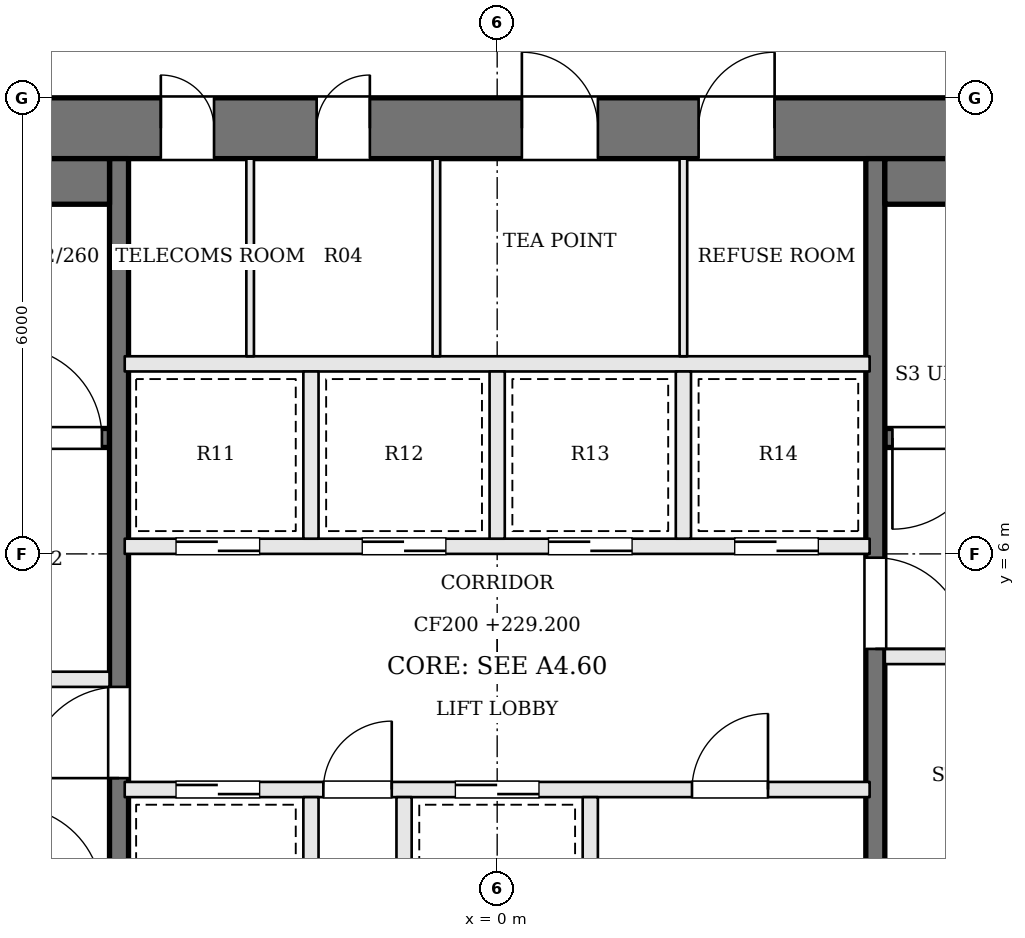
"""IFC4 building model, lengths in metres.
Left out: names, types, materials, properties, quantities, classifications, styles, units other than length and angle.
Written with IfcOpenShell. Run it as: python <this file> out.ifc"""

import sys

from ifc_helpers import new_model, si_unit, direction, frame, frame_2d, origin, place, context, subcontext, project, spatial, rectangle, extrude, element, fill, save


model = new_model("IFC4")
c1 = context("Model", 3, precision=1e-05, world=origin(), true_north=direction((0.0, 1.0)))
c2 = subcontext(c1, "Body", "Model", "MODEL_VIEW")
j1 = project(units=[si_unit("LENGTHUNIT", "METRE"), si_unit("PLANEANGLEUNIT", "RADIAN")], contexts=[c1])
p1 = place(None, origin())
s1 = spatial("IfcSite", under=j1, at=p1, CompositionType="ELEMENT")
p2 = place(p1, origin())
s2 = spatial("IfcBuilding", under=s1, at=p2, CompositionType="ELEMENT")
p3 = place(p2, frame((0.0, 0.0, 229.2)))
s3 = spatial("IfcBuildingStorey", under=s2, at=p3, CompositionType="ELEMENT", Elevation=229.2)
p4 = place(p3, frame((-13.0, 11.6, 0.0), z_axis=(0.0, 0.0, 1.0), x_axis=(1.0, 0.0, 0.0)))
e1 = element("IfcWall", 1, at=p4, inside=s3, PredefinedType="SHEAR", context=c2, shape_type="SweptSolid", body=[
    extrude(rectangle(XDim=26.0, YDim=0.8, at=frame_2d((13.0, 0.0))), origin(), (0.0, 0.0, 1.0), 3.9),
])
p5 = place(p4, frame((8.575, 0.0, 0.0)))
e2 = element("IfcOpeningElement", 2, at=p5, cuts=e1, PredefinedType="OPENING", context=c2, shape_type="SweptSolid", body=[
    extrude(rectangle(XDim=0.7, YDim=2.1, at=frame_2d((0.35, 1.05))), frame((0.0, 0.41, 0.0), z_axis=(0.0, -1.0, 0.0), x_axis=(1.0, 0.0, 0.0)), (0.0, 0.0, 1.0), 0.82),
])
p6 = place(p4, frame((10.625, 0.0, 0.0)))
e3 = element("IfcOpeningElement", 3, at=p6, cuts=e1, PredefinedType="OPENING", context=c2, shape_type="SweptSolid", body=[
    extrude(rectangle(XDim=0.7, YDim=2.1, at=frame_2d((0.35, 1.05))), frame((0.0, 0.41, 0.0), z_axis=(0.0, -1.0, 0.0), x_axis=(1.0, 0.0, 0.0)), (0.0, 0.0, 1.0), 0.82),
])
p7 = place(p4, frame((13.325, 0.0, 0.0)))
e4 = element("IfcOpeningElement", 4, at=p7, cuts=e1, PredefinedType="OPENING", context=c2, shape_type="SweptSolid", body=[
    extrude(rectangle(XDim=1.0, YDim=2.1, at=frame_2d((0.5, 1.05))), frame((0.0, 0.41, 0.0), z_axis=(0.0, -1.0, 0.0), x_axis=(1.0, 0.0, 0.0)), (0.0, 0.0, 1.0), 0.82),
])
p8 = place(p4, frame((15.65, 0.0, 0.0)))
e5 = element("IfcOpeningElement", 5, at=p8, cuts=e1, PredefinedType="OPENING", context=c2, shape_type="SweptSolid", body=[
    extrude(rectangle(XDim=1.0, YDim=2.1, at=frame_2d((0.5, 1.05))), frame((0.0, 0.41, 0.0), z_axis=(0.0, -1.0, 0.0), x_axis=(1.0, 0.0, 0.0)), (0.0, 0.0, 1.0), 0.82),
])
p9 = place(p3, frame((12.2, 7.525, 0.0), z_axis=(0.0, 0.0, 1.0), x_axis=(-1.0, 0.0, 0.0)))
e6 = element("IfcWall", 6, at=p9, inside=s3, PredefinedType="SOLIDWALL", context=c2, shape_type="SweptSolid", body=[
    extrude(rectangle(XDim=7.1, YDim=0.25, at=frame_2d((3.55, 0.0))), origin(), (0.0, 0.0, 1.0), 3.7),
])
p10 = place(p9, frame((5.8, 0.0, 0.0)))
e7 = element("IfcOpeningElement", 7, at=p10, cuts=e6, PredefinedType="OPENING", context=c2, shape_type="SweptSolid", body=[
    extrude(rectangle(XDim=1.2, YDim=2.1, at=frame_2d((0.6, 1.05))), frame((0.0, 0.135, 0.0), z_axis=(0.0, -1.0, 0.0), x_axis=(1.0, 0.0, 0.0)), (0.0, 0.0, 1.0), 0.27),
])
p11 = place(p3, frame((-12.2, 4.35, 0.0), z_axis=(0.0, 0.0, 1.0), x_axis=(1.0, 0.0, 0.0)))
e8 = element("IfcWall", 8, at=p11, inside=s3, PredefinedType="SOLIDWALL", context=c2, shape_type="SweptSolid", body=[
    extrude(rectangle(XDim=7.1, YDim=0.2, at=frame_2d((3.55, 0.0))), origin(), (0.0, 0.0, 1.0), 3.7),
])
p12 = place(p11, frame((4.4, 0.0, 0.0)))
e9 = element("IfcOpeningElement", 9, at=p12, cuts=e8, PredefinedType="OPENING", context=c2, shape_type="SweptSolid", body=[
    extrude(rectangle(XDim=1.2, YDim=2.1, at=frame_2d((0.6, 1.05))), frame((0.0, 0.11, 0.0), z_axis=(0.0, -1.0, 0.0), x_axis=(1.0, 0.0, 0.0)), (0.0, 0.0, 1.0), 0.22),
])
p13 = place(p11, frame((1.1, 0.0, 0.0)))
e10 = element("IfcOpeningElement", 10, at=p13, cuts=e8, PredefinedType="OPENING", context=c2, shape_type="SweptSolid", body=[
    extrude(rectangle(XDim=1.2, YDim=2.1, at=frame_2d((0.6, 1.05))), frame((0.0, 0.11, 0.0), z_axis=(0.0, -1.0, 0.0), x_axis=(1.0, 0.0, 0.0)), (0.0, 0.0, 1.0), 0.22),
])
p14 = place(p3, frame((12.2, 4.65, 0.0), z_axis=(0.0, 0.0, 1.0), x_axis=(-1.0, 0.0, 0.0)))
e11 = element("IfcWall", 11, at=p14, inside=s3, PredefinedType="SOLIDWALL", context=c2, shape_type="SweptSolid", body=[
    extrude(rectangle(XDim=7.1, YDim=0.2, at=frame_2d((3.55, 0.0))), origin(), (0.0, 0.0, 1.0), 3.7),
])
p15 = place(p14, frame((4.4, 0.0, 0.0)))
e12 = element("IfcOpeningElement", 12, at=p15, cuts=e11, PredefinedType="OPENING", context=c2, shape_type="SweptSolid", body=[
    extrude(rectangle(XDim=1.2, YDim=2.1, at=frame_2d((0.6, 1.05))), frame((0.0, 0.11, 0.0), z_axis=(0.0, -1.0, 0.0), x_axis=(1.0, 0.0, 0.0)), (0.0, 0.0, 1.0), 0.22),
])
p16 = place(p14, frame((1.1, 0.0, 0.0)))
e13 = element("IfcOpeningElement", 13, at=p16, cuts=e11, PredefinedType="OPENING", context=c2, shape_type="SweptSolid", body=[
    extrude(rectangle(XDim=1.2, YDim=2.1, at=frame_2d((0.6, 1.05))), frame((0.0, 0.11, 0.0), z_axis=(0.0, -1.0, 0.0), x_axis=(1.0, 0.0, 0.0)), (0.0, 0.0, 1.0), 0.22),
])
p17 = place(p3, frame((-12.2, 7.525, 0.0), z_axis=(0.0, 0.0, 1.0), x_axis=(1.0, 0.0, 0.0)))
e14 = element("IfcWall", 14, at=p17, inside=s3, PredefinedType="SOLIDWALL", context=c2, shape_type="SweptSolid", body=[
    extrude(rectangle(XDim=7.1, YDim=0.25, at=frame_2d((3.55, 0.0))), origin(), (0.0, 0.0, 1.0), 3.7),
])
p18 = place(p17, frame((5.8, 0.0, 0.0)))
e15 = element("IfcOpeningElement", 15, at=p18, cuts=e14, PredefinedType="OPENING", context=c2, shape_type="SweptSolid", body=[
    extrude(rectangle(XDim=1.2, YDim=2.1, at=frame_2d((0.6, 1.05))), frame((0.0, 0.135, 0.0), z_axis=(0.0, -1.0, 0.0), x_axis=(1.0, 0.0, 0.0)), (0.0, 0.0, 1.0), 0.27),
])
p19 = place(p3, frame((-4.975, -2.2, 0.0), z_axis=(0.0, 0.0, 1.0), x_axis=(0.0, 1.0, 0.0)))
e16 = element("IfcWall", 16, at=p19, inside=s3, PredefinedType="SOLIDWALL", context=c2, shape_type="SweptSolid", body=[
    extrude(rectangle(XDim=13.4, YDim=0.25, at=frame_2d((6.7, 0.0))), origin(), (0.0, 0.0, 1.0), 3.7),
])
p20 = place(p19, frame((5.25, 0.0, 0.0)))
e17 = element("IfcOpeningElement", 17, at=p20, cuts=e16, PredefinedType="OPENING", context=c2, shape_type="SweptSolid", body=[
    extrude(rectangle(XDim=1.2, YDim=2.1, at=frame_2d((0.6, 1.05))), frame((0.0, 0.135, 0.0), z_axis=(0.0, -1.0, 0.0), x_axis=(1.0, 0.0, 0.0)), (0.0, 0.0, 1.0), 0.27),
])
p21 = place(p3, frame((4.975, 11.2, 0.0), z_axis=(0.0, 0.0, 1.0), x_axis=(0.0, -1.0, 0.0)))
e18 = element("IfcWall", 18, at=p21, inside=s3, PredefinedType="SOLIDWALL", context=c2, shape_type="SweptSolid", body=[
    extrude(rectangle(XDim=13.4, YDim=0.25, at=frame_2d((6.7, 0.0))), origin(), (0.0, 0.0, 1.0), 3.7),
])
p22 = place(p21, frame((5.25, 0.0, 0.0)))
e19 = element("IfcOpeningElement", 19, at=p22, cuts=e18, PredefinedType="OPENING", context=c2, shape_type="SweptSolid", body=[
    extrude(rectangle(XDim=1.2, YDim=2.1, at=frame_2d((0.6, 1.05))), frame((0.0, 0.135, 0.0), z_axis=(0.0, -1.0, 0.0), x_axis=(1.0, 0.0, 0.0)), (0.0, 0.0, 1.0), 0.27),
])
for number, where, z_axis, x_axis in (
    (20, (-12.2, 10.9, 0.0), (0.0, 0.0, 1.0), (1.0, 0.0, 0.0)),
    (21, (12.2, 10.9, 0.0), (0.0, 0.0, 1.0), (-1.0, 0.0, 0.0)),
):
    element("IfcWall", number, at=place(p3, frame(where, z_axis=z_axis, x_axis=x_axis)), inside=s3, PredefinedType="SOLIDWALL", context=c2, shape_type="SweptSolid", body=[
        extrude(rectangle(XDim=7.1, YDim=0.6, at=frame_2d((3.55, 0.0))), origin(), (0.0, 0.0, 1.0), 3.7),
    ])
p23 = place(p3, frame((-4.9, 2.9, 0.0), z_axis=(0.0, 0.0, 1.0), x_axis=(1.0, 0.0, 0.0)))
e22 = element("IfcWall", 22, at=p23, inside=s3, PredefinedType="SOLIDWALL", context=c2, shape_type="SweptSolid", body=[
    extrude(rectangle(XDim=9.8, YDim=0.2, at=frame_2d((4.9, 0.0))), origin(), (0.0, 0.0, 1.0), 3.7),
])
p24 = place(p23, frame((0.675, 0.0, 0.0)))
e23 = element("IfcOpeningElement", 23, at=p24, cuts=e22, PredefinedType="OPENING", context=c2, shape_type="SweptSolid", body=[
    extrude(rectangle(XDim=1.1, YDim=2.1, at=frame_2d((0.55, 1.05))), frame((0.0, 0.11, 0.0), z_axis=(0.0, -1.0, 0.0), x_axis=(1.0, 0.0, 0.0)), (0.0, 0.0, 1.0), 0.22),
])
p25 = place(p23, frame((2.613, 0.0, 0.0)))
e24 = element("IfcOpeningElement", 24, at=p25, cuts=e22, PredefinedType="OPENING", context=c2, shape_type="SweptSolid", body=[
    extrude(rectangle(XDim=0.9, YDim=2.1, at=frame_2d((0.45, 1.05))), frame((0.0, 0.11, 0.0), z_axis=(0.0, -1.0, 0.0), x_axis=(1.0, 0.0, 0.0)), (0.0, 0.0, 1.0), 0.22),
])
p26 = place(p23, frame((4.35, 0.0, 0.0)))
e25 = element("IfcOpeningElement", 25, at=p26, cuts=e22, PredefinedType="OPENING", context=c2, shape_type="SweptSolid", body=[
    extrude(rectangle(XDim=1.1, YDim=2.1, at=frame_2d((0.55, 1.05))), frame((0.0, 0.11, 0.0), z_axis=(0.0, -1.0, 0.0), x_axis=(1.0, 0.0, 0.0)), (0.0, 0.0, 1.0), 0.22),
])
p27 = place(p23, frame((7.463, 0.0, 0.0)))
e26 = element("IfcOpeningElement", 26, at=p27, cuts=e22, PredefinedType="OPENING", context=c2, shape_type="SweptSolid", body=[
    extrude(rectangle(XDim=1.0, YDim=2.1, at=frame_2d((0.5, 1.05))), frame((0.0, 0.11, 0.0), z_axis=(0.0, -1.0, 0.0), x_axis=(1.0, 0.0, 0.0)), (0.0, 0.0, 1.0), 0.22),
])
p28 = place(p3, frame((-4.9, 6.1, 0.0), z_axis=(0.0, 0.0, 1.0), x_axis=(1.0, 0.0, 0.0)))
e27 = element("IfcWall", 27, at=p28, inside=s3, PredefinedType="SOLIDWALL", context=c2, shape_type="SweptSolid", body=[
    extrude(rectangle(XDim=9.8, YDim=0.2, at=frame_2d((4.9, 0.0))), origin(), (0.0, 0.0, 1.0), 3.7),
])
p29 = place(p28, frame((0.675, 0.0, 0.0)))
e28 = element("IfcOpeningElement", 28, at=p29, cuts=e27, PredefinedType="OPENING", context=c2, shape_type="SweptSolid", body=[
    extrude(rectangle(XDim=1.1, YDim=2.1, at=frame_2d((0.55, 1.05))), frame((0.0, 0.11, 0.0), z_axis=(0.0, -1.0, 0.0), x_axis=(1.0, 0.0, 0.0)), (0.0, 0.0, 1.0), 0.22),
])
p30 = place(p28, frame((3.125, 0.0, 0.0)))
e29 = element("IfcOpeningElement", 29, at=p30, cuts=e27, PredefinedType="OPENING", context=c2, shape_type="SweptSolid", body=[
    extrude(rectangle(XDim=1.1, YDim=2.1, at=frame_2d((0.55, 1.05))), frame((0.0, 0.11, 0.0), z_axis=(0.0, -1.0, 0.0), x_axis=(1.0, 0.0, 0.0)), (0.0, 0.0, 1.0), 0.22),
])
p31 = place(p28, frame((5.575, 0.0, 0.0)))
e30 = element("IfcOpeningElement", 30, at=p31, cuts=e27, PredefinedType="OPENING", context=c2, shape_type="SweptSolid", body=[
    extrude(rectangle(XDim=1.1, YDim=2.1, at=frame_2d((0.55, 1.05))), frame((0.0, 0.11, 0.0), z_axis=(0.0, -1.0, 0.0), x_axis=(1.0, 0.0, 0.0)), (0.0, 0.0, 1.0), 0.22),
])
p32 = place(p28, frame((8.025, 0.0, 0.0)))
e31 = element("IfcOpeningElement", 31, at=p32, cuts=e27, PredefinedType="OPENING", context=c2, shape_type="SweptSolid", body=[
    extrude(rectangle(XDim=1.1, YDim=2.1, at=frame_2d((0.55, 1.05))), frame((0.0, 0.11, 0.0), z_axis=(0.0, -1.0, 0.0), x_axis=(1.0, 0.0, 0.0)), (0.0, 0.0, 1.0), 0.22),
])
p33 = place(p3, frame((-4.9, 8.5, 0.0), z_axis=(0.0, 0.0, 1.0), x_axis=(1.0, 0.0, 0.0)))
e32 = element("IfcWall", 32, at=p33, inside=s3, PredefinedType="SOLIDWALL", context=c2, shape_type="SweptSolid", body=[
    extrude(rectangle(XDim=9.8, YDim=0.2, at=frame_2d((4.9, 0.0))), origin(), (0.0, 0.0, 1.0), 3.7),
])
for number, where, z_axis, x_axis in (
    (33, (-2.45, 0.6, 0.0), (0.0, 0.0, 1.0), (0.0, 1.0, 0.0)),
    (34, (-1.225, 0.6, 0.0), (0.0, 0.0, 1.0), (0.0, 1.0, 0.0)),
    (35, (1.225, 0.6, 0.0), (0.0, 0.0, 1.0), (0.0, 1.0, 0.0)),
    (36, (-2.45, 6.2, 0.0), (0.0, 0.0, 1.0), (0.0, 1.0, 0.0)),
    (37, (0.0, 6.2, 0.0), (0.0, 0.0, 1.0), (0.0, 1.0, 0.0)),
    (38, (2.45, 6.2, 0.0), (0.0, 0.0, 1.0), (0.0, 1.0, 0.0)),
):
    element("IfcWall", number, at=place(p3, frame(where, z_axis=z_axis, x_axis=x_axis)), inside=s3, PredefinedType="SOLIDWALL", context=c2, shape_type="SweptSolid", body=[
        extrude(rectangle(XDim=2.2, YDim=0.2, at=frame_2d((1.1, 0.0))), origin(), (0.0, 0.0, 1.0), 3.7),
    ])
for number, where, z_axis, x_axis in (
    (39, (-3.25, 8.6, 0.0), (0.0, 0.0, 1.0), (0.0, 1.0, 0.0)),
    (40, (-0.8, 8.6, 0.0), (0.0, 0.0, 1.0), (0.0, 1.0, 0.0)),
    (41, (2.45, 8.6, 0.0), (0.0, 0.0, 1.0), (0.0, 1.0, 0.0)),
):
    element("IfcWall", number, at=place(p3, frame(where, z_axis=z_axis, x_axis=x_axis)), inside=s3, PredefinedType="PARTITIONING", context=c2, shape_type="SweptSolid", body=[
        extrude(rectangle(XDim=2.6, YDim=0.1, at=frame_2d((1.3, 0.0))), origin(), (0.0, 0.0, 1.0), 3.7),
    ])
p34 = place(p20, origin())
e42 = element("IfcDoor", 42, at=p34, inside=s3, OperationType="SINGLE_SWING_LEFT", PredefinedType="DOOR", context=c2, shape_type="SweptSolid", body=[
    extrude(rectangle(XDim=1.2, YDim=2.1, at=frame_2d((0.6, 1.05))), frame((0.0, 0.025, 0.0), z_axis=(0.0, -1.0, 0.0), x_axis=(1.0, 0.0, 0.0)), (0.0, 0.0, 1.0), 0.05),
])
fill(e17, e42)
p35 = place(p22, origin())
e43 = element("IfcDoor", 43, at=p35, inside=s3, OperationType="SINGLE_SWING_RIGHT", PredefinedType="DOOR", context=c2, shape_type="SweptSolid", body=[
    extrude(rectangle(XDim=1.2, YDim=2.1, at=frame_2d((0.6, 1.05))), frame((0.0, 0.025, 0.0), z_axis=(0.0, -1.0, 0.0), x_axis=(1.0, 0.0, 0.0)), (0.0, 0.0, 1.0), 0.05),
])
fill(e19, e43)
p36 = place(p10, origin())
e44 = element("IfcDoor", 44, at=p36, inside=s3, OperationType="SINGLE_SWING_RIGHT", PredefinedType="DOOR", context=c2, shape_type="SweptSolid", body=[
    extrude(rectangle(XDim=1.2, YDim=2.1, at=frame_2d((0.6, 1.05))), frame((0.0, 0.025, 0.0), z_axis=(0.0, -1.0, 0.0), x_axis=(1.0, 0.0, 0.0)), (0.0, 0.0, 1.0), 0.05),
])
fill(e7, e44)
p37 = place(p18, origin())
e45 = element("IfcDoor", 45, at=p37, inside=s3, OperationType="SINGLE_SWING_LEFT", PredefinedType="DOOR", context=c2, shape_type="SweptSolid", body=[
    extrude(rectangle(XDim=1.2, YDim=2.1, at=frame_2d((0.6, 1.05))), frame((0.0, 0.025, 0.0), z_axis=(0.0, -1.0, 0.0), x_axis=(1.0, 0.0, 0.0)), (0.0, 0.0, 1.0), 0.05),
])
fill(e15, e45)
p38 = place(p24, origin())
e46 = element("IfcDoor", 46, at=p38, inside=s3, OperationType="SLIDING_TO_RIGHT", PredefinedType="DOOR", context=c2, shape_type="SweptSolid", body=[
    extrude(rectangle(XDim=1.1, YDim=2.1, at=frame_2d((0.55, 1.05))), frame((0.0, 0.025, 0.0), z_axis=(0.0, -1.0, 0.0), x_axis=(1.0, 0.0, 0.0)), (0.0, 0.0, 1.0), 0.05),
])
fill(e23, e46)
p39 = place(p25, origin())
e47 = element("IfcDoor", 47, at=p39, inside=s3, OperationType="SINGLE_SWING_RIGHT", PredefinedType="DOOR", context=c2, shape_type="SweptSolid", body=[
    extrude(rectangle(XDim=0.9, YDim=2.1, at=frame_2d((0.45, 1.05))), frame((0.0, 0.025, 0.0), z_axis=(0.0, -1.0, 0.0), x_axis=(1.0, 0.0, 0.0)), (0.0, 0.0, 1.0), 0.05),
])
fill(e24, e47)
p40 = place(p26, origin())
e48 = element("IfcDoor", 48, at=p40, inside=s3, OperationType="SLIDING_TO_LEFT", PredefinedType="DOOR", context=c2, shape_type="SweptSolid", body=[
    extrude(rectangle(XDim=1.1, YDim=2.1, at=frame_2d((0.55, 1.05))), frame((0.0, 0.025, 0.0), z_axis=(0.0, -1.0, 0.0), x_axis=(1.0, 0.0, 0.0)), (0.0, 0.0, 1.0), 0.05),
])
fill(e25, e48)
p41 = place(p27, origin())
e49 = element("IfcDoor", 49, at=p41, inside=s3, OperationType="SINGLE_SWING_RIGHT", PredefinedType="DOOR", context=c2, shape_type="SweptSolid", body=[
    extrude(rectangle(XDim=1.0, YDim=2.1, at=frame_2d((0.5, 1.05))), frame((0.0, 0.025, 0.0), z_axis=(0.0, -1.0, 0.0), x_axis=(1.0, 0.0, 0.0)), (0.0, 0.0, 1.0), 0.05),
])
fill(e26, e49)
p42 = place(p29, origin())
e50 = element("IfcDoor", 50, at=p42, inside=s3, OperationType="SLIDING_TO_RIGHT", PredefinedType="DOOR", context=c2, shape_type="SweptSolid", body=[
    extrude(rectangle(XDim=1.1, YDim=2.1, at=frame_2d((0.55, 1.05))), frame((0.0, 0.025, 0.0), z_axis=(0.0, -1.0, 0.0), x_axis=(1.0, 0.0, 0.0)), (0.0, 0.0, 1.0), 0.05),
])
fill(e28, e50)
p43 = place(p30, origin())
e51 = element("IfcDoor", 51, at=p43, inside=s3, OperationType="SLIDING_TO_LEFT", PredefinedType="DOOR", context=c2, shape_type="SweptSolid", body=[
    extrude(rectangle(XDim=1.1, YDim=2.1, at=frame_2d((0.55, 1.05))), frame((0.0, 0.025, 0.0), z_axis=(0.0, -1.0, 0.0), x_axis=(1.0, 0.0, 0.0)), (0.0, 0.0, 1.0), 0.05),
])
fill(e29, e51)
p44 = place(p31, origin())
e52 = element("IfcDoor", 52, at=p44, inside=s3, OperationType="SLIDING_TO_RIGHT", PredefinedType="DOOR", context=c2, shape_type="SweptSolid", body=[
    extrude(rectangle(XDim=1.1, YDim=2.1, at=frame_2d((0.55, 1.05))), frame((0.0, 0.025, 0.0), z_axis=(0.0, -1.0, 0.0), x_axis=(1.0, 0.0, 0.0)), (0.0, 0.0, 1.0), 0.05),
])
fill(e30, e52)
p45 = place(p32, origin())
e53 = element("IfcDoor", 53, at=p45, inside=s3, OperationType="SLIDING_TO_LEFT", PredefinedType="DOOR", context=c2, shape_type="SweptSolid", body=[
    extrude(rectangle(XDim=1.1, YDim=2.1, at=frame_2d((0.55, 1.05))), frame((0.0, 0.025, 0.0), z_axis=(0.0, -1.0, 0.0), x_axis=(1.0, 0.0, 0.0)), (0.0, 0.0, 1.0), 0.05),
])
fill(e31, e53)
p46 = place(p5, origin())
e54 = element("IfcDoor", 54, at=p46, inside=s3, OperationType="SINGLE_SWING_LEFT", PredefinedType="DOOR", context=c2, shape_type="SweptSolid", body=[
    extrude(rectangle(XDim=0.7, YDim=2.1, at=frame_2d((0.35, 1.05))), frame((0.0, 0.025, 0.0), z_axis=(0.0, -1.0, 0.0), x_axis=(1.0, 0.0, 0.0)), (0.0, 0.0, 1.0), 0.05),
])
fill(e2, e54)
p47 = place(p6, origin())
e55 = element("IfcDoor", 55, at=p47, inside=s3, OperationType="SINGLE_SWING_RIGHT", PredefinedType="DOOR", context=c2, shape_type="SweptSolid", body=[
    extrude(rectangle(XDim=0.7, YDim=2.1, at=frame_2d((0.35, 1.05))), frame((0.0, 0.025, 0.0), z_axis=(0.0, -1.0, 0.0), x_axis=(1.0, 0.0, 0.0)), (0.0, 0.0, 1.0), 0.05),
])
fill(e3, e55)
p48 = place(p7, origin())
e56 = element("IfcDoor", 56, at=p48, inside=s3, OperationType="SINGLE_SWING_LEFT", PredefinedType="DOOR", context=c2, shape_type="SweptSolid", body=[
    extrude(rectangle(XDim=1.0, YDim=2.1, at=frame_2d((0.5, 1.05))), frame((0.0, 0.025, 0.0), z_axis=(0.0, -1.0, 0.0), x_axis=(1.0, 0.0, 0.0)), (0.0, 0.0, 1.0), 0.05),
])
fill(e4, e56)
p49 = place(p8, origin())
e57 = element("IfcDoor", 57, at=p49, inside=s3, OperationType="SINGLE_SWING_RIGHT", PredefinedType="DOOR", context=c2, shape_type="SweptSolid", body=[
    extrude(rectangle(XDim=1.0, YDim=2.1, at=frame_2d((0.5, 1.05))), frame((0.0, 0.025, 0.0), z_axis=(0.0, -1.0, 0.0), x_axis=(1.0, 0.0, 0.0)), (0.0, 0.0, 1.0), 0.05),
])
fill(e5, e57)
save(model, sys.argv[1])
